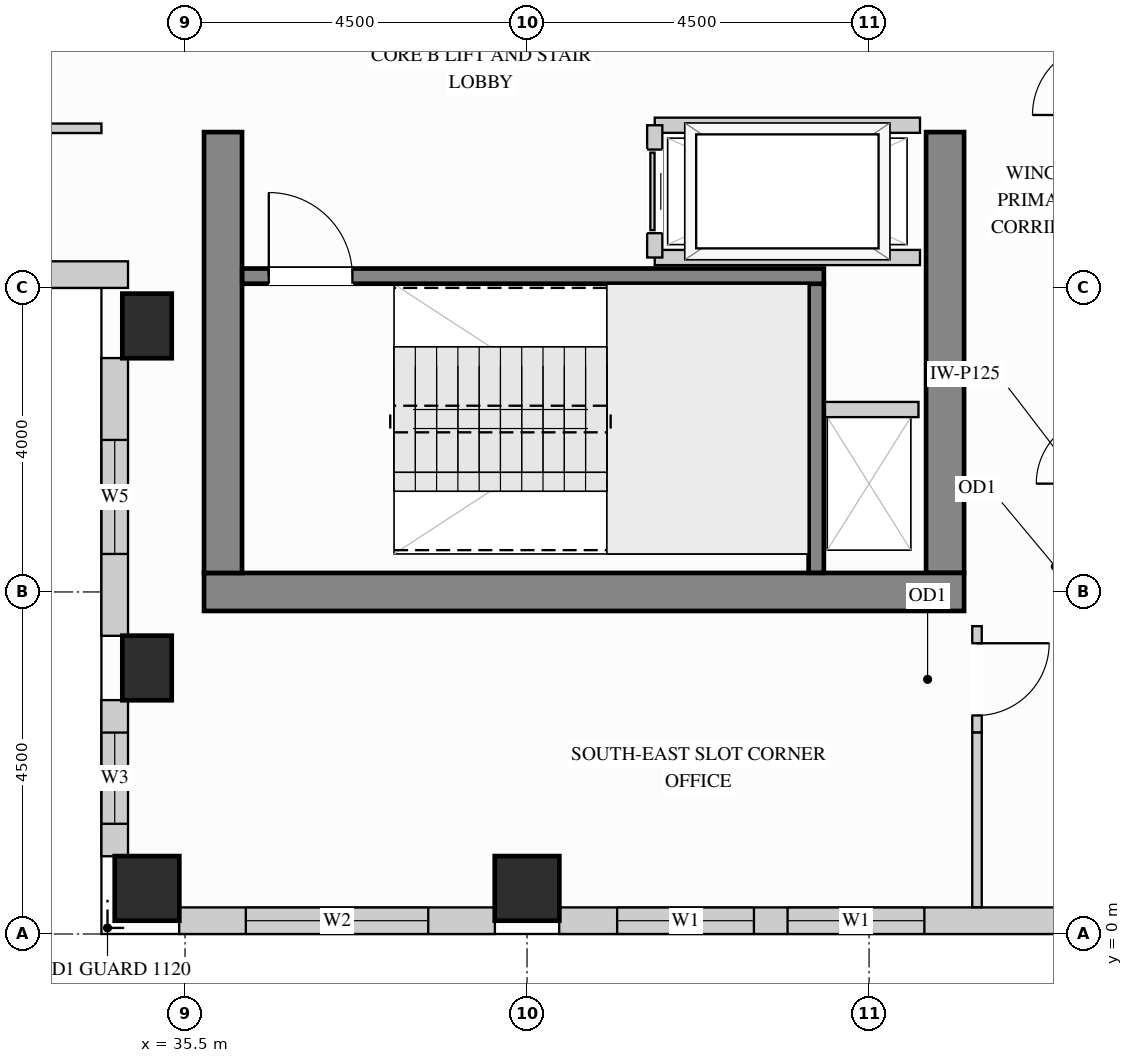
"""IFC4 building model, lengths in metres.
Left out: names, types, materials, properties, quantities, classifications, styles, units other than length and angle.
Written with IfcOpenShell. Run it as: python <this file> out.ifc"""

import sys

from ifc_helpers import new_model, si_unit, direction, frame, frame_2d, origin, origin_2d, place, context, subcontext, project, spatial, rectangle, extrude, source, transform, mapped, element, fill, save


model = new_model("IFC4")
c1 = context("Model", 3, precision=1e-05, world=origin(), true_north=direction((0.0, 1.0)))
c2 = subcontext(c1, "Body", "Model", "MODEL_VIEW")
j1 = project(units=[si_unit("LENGTHUNIT", "METRE"), si_unit("PLANEANGLEUNIT", "RADIAN")], contexts=[c1])
p1 = place(None, origin())
s1 = spatial("IfcSite", under=j1, at=p1, CompositionType="ELEMENT")
p2 = place(p1, origin())
s2 = spatial("IfcBuilding", under=s1, at=p2, CompositionType="ELEMENT")
p3 = place(p2, frame((0.0, 0.0, 226.8)))
s3 = spatial("IfcBuildingStorey", under=s2, at=p3, CompositionType="ELEMENT", Elevation=226.8)
m1 = source(origin(), c2, "Body", "SweptSolid", [
    extrude(rectangle(XDim=0.65, YDim=0.85, at=origin_2d()), origin(), (0.0, 0.0, 1.0), 3.4),
])
for number, where, z_axis, x_axis in (
    (1, (35.0, 3.5, 0.0), (0.0, 0.0, 1.0), (1.0, 0.0, 0.0)),
    (2, (35.0, 8.0, 0.0), (0.0, 0.0, 1.0), (1.0, 0.0, 0.0)),
):
    element("IfcColumn", number, at=place(p3, frame(where, z_axis=z_axis, x_axis=x_axis)), inside=s3, PredefinedType="COLUMN", context=c2, shape_type="MappedRepresentation", body=[
        mapped(m1, transform((0.0, 0.0, 0.0), x_axis=(1.0, 0.0, 0.0), y_axis=(0.0, 1.0, 0.0), z_axis=(0.0, 0.0, 1.0))),
    ])
m2 = source(origin(), c2, "Body", "SweptSolid", [
    extrude(rectangle(XDim=0.85, YDim=0.85, at=origin_2d()), origin(), (0.0, 0.0, 1.0), 3.4),
])
for number, where, z_axis, x_axis in (
    (3, (35.0, 0.6, 0.0), (0.0, 0.0, 1.0), (1.0, 0.0, 0.0)),
    (4, (40.0, 0.6, 0.0), (0.0, 0.0, 1.0), (1.0, 0.0, 0.0)),
):
    element("IfcColumn", number, at=place(p3, frame(where, z_axis=z_axis, x_axis=x_axis)), inside=s3, PredefinedType="COLUMN", context=c2, shape_type="MappedRepresentation", body=[
        mapped(m2, transform((0.0, 0.0, 0.0), x_axis=(1.0, 0.0, 0.0), y_axis=(0.0, 1.0, 0.0), z_axis=(0.0, 0.0, 1.0))),
    ])
m3 = source(origin(), c2, "Body", "SweptSolid", [
    extrude(rectangle(XDim=5.8, YDim=0.5, at=frame_2d((2.9, 0.0))), origin(), (0.0, 0.0, 1.0), 3.4),
])
p4 = place(p3, frame((45.5, 4.75, 0.0), z_axis=(0.0, 0.0, 1.0), x_axis=(0.0, 1.0, 0.0)))
e5 = element("IfcWall", 5, at=p4, inside=s3, PredefinedType="SHEAR", context=c2, shape_type="MappedRepresentation", body=[
    mapped(m3, transform((0.0, 0.0, 0.0), x_axis=(1.0, 0.0, 0.0), y_axis=(0.0, 1.0, 0.0), z_axis=(0.0, 0.0, 1.0))),
])
m4 = source(origin(), c2, "Body", "SweptSolid", [
    extrude(rectangle(XDim=10.0, YDim=0.5, at=frame_2d((5.0, 0.0))), origin(), (0.0, 0.0, 1.0), 3.4),
])
p5 = place(p3, frame((35.75, 4.5, 0.0), z_axis=(0.0, 0.0, 1.0), x_axis=(1.0, 0.0, 0.0)))
e6 = element("IfcWall", 6, at=p5, inside=s3, PredefinedType="SHEAR", context=c2, shape_type="MappedRepresentation", body=[
    mapped(m4, transform((0.0, 0.0, 0.0), x_axis=(1.0, 0.0, 0.0), y_axis=(0.0, 1.0, 0.0), z_axis=(0.0, 0.0, 1.0))),
])
p6 = place(p3, frame((36.0, 4.75, 0.0), z_axis=(0.0, 0.0, 1.0), x_axis=(0.0, 1.0, 0.0)))
e7 = element("IfcWall", 7, at=p6, inside=s3, PredefinedType="SHEAR", context=c2, shape_type="MappedRepresentation", body=[
    mapped(m3, transform((0.0, 0.0, 0.0), x_axis=(1.0, 0.0, 0.0), y_axis=(0.0, 1.0, 0.0), z_axis=(0.0, 0.0, 1.0))),
])
p7 = place(p3, frame((19.323, 8.675, 0.0), z_axis=(0.0, 0.0, 1.0), x_axis=(1.0, 0.0, 0.0)))
e8 = element("IfcWall", 8, at=p7, inside=s3, PredefinedType="SOLIDWALL", context=c2, shape_type="SweptSolid", body=[
    extrude(rectangle(XDim=15.427, YDim=0.35, at=frame_2d((7.713, 0.0))), origin(), (0.0, 0.0, 1.0), 3.385),
])
p8 = place(p7, frame((1.672, 0.0, 0.78)))
e9 = element("IfcOpeningElement", 9, at=p8, cuts=e8, PredefinedType="OPENING", context=c2, shape_type="SweptSolid", body=[
    extrude(rectangle(XDim=1.5, YDim=2.0, at=frame_2d((0.75, 1.0))), frame((0.0, 0.185, 0.0), z_axis=(0.0, -1.0, 0.0), x_axis=(1.0, 0.0, 0.0)), (0.0, 0.0, 1.0), 0.37),
])
p9 = place(p7, frame((4.525, 0.0, 0.78)))
e10 = element("IfcOpeningElement", 10, at=p9, cuts=e8, PredefinedType="OPENING", context=c2, shape_type="SweptSolid", body=[
    extrude(rectangle(XDim=1.5, YDim=2.0, at=frame_2d((0.75, 1.0))), frame((0.0, 0.185, 0.0), z_axis=(0.0, -1.0, 0.0), x_axis=(1.0, 0.0, 0.0)), (0.0, 0.0, 1.0), 0.37),
])
p10 = place(p7, frame((9.287, 0.0, 0.78)))
e11 = element("IfcOpeningElement", 11, at=p10, cuts=e8, PredefinedType="OPENING", context=c2, shape_type="SweptSolid", body=[
    extrude(rectangle(XDim=1.5, YDim=2.0, at=frame_2d((0.75, 1.0))), frame((0.0, 0.185, 0.0), z_axis=(0.0, -1.0, 0.0), x_axis=(1.0, 0.0, 0.0)), (0.0, 0.0, 1.0), 0.37),
])
p11 = place(p7, frame((12.197, 0.0, 0.78)))
e12 = element("IfcOpeningElement", 12, at=p11, cuts=e8, PredefinedType="OPENING", context=c2, shape_type="SweptSolid", body=[
    extrude(rectangle(XDim=1.5, YDim=2.0, at=frame_2d((0.75, 1.0))), frame((0.0, 0.185, 0.0), z_axis=(0.0, -1.0, 0.0), x_axis=(1.0, 0.0, 0.0)), (0.0, 0.0, 1.0), 0.37),
])
p12 = place(p3, frame((34.575, 7.577, 0.0), z_axis=(0.0, 0.0, 1.0), x_axis=(0.0, -1.0, 0.0)))
e13 = element("IfcWall", 13, at=p12, inside=s3, PredefinedType="SOLIDWALL", context=c2, shape_type="SweptSolid", body=[
    extrude(rectangle(XDim=3.654, YDim=0.35, at=frame_2d((1.827, 0.0))), origin(), (0.0, 0.0, 1.0), 3.385),
])
p13 = place(p12, frame((1.077, 0.0, 0.78)))
e14 = element("IfcOpeningElement", 14, at=p13, cuts=e13, PredefinedType="OPENING", context=c2, shape_type="SweptSolid", body=[
    extrude(rectangle(XDim=1.5, YDim=2.0, at=frame_2d((0.75, 1.0))), frame((0.0, 0.185, 0.0), z_axis=(0.0, -1.0, 0.0), x_axis=(1.0, 0.0, 0.0)), (0.0, 0.0, 1.0), 0.37),
])
p14 = place(p3, frame((34.575, 3.077, 0.0), z_axis=(0.0, 0.0, 1.0), x_axis=(0.0, -1.0, 0.0)))
e15 = element("IfcWall", 15, at=p14, inside=s3, PredefinedType="SOLIDWALL", context=c2, shape_type="SweptSolid", body=[
    extrude(rectangle(XDim=2.054, YDim=0.35, at=frame_2d((1.027, 0.0))), origin(), (0.0, 0.0, 1.0), 3.385),
])
p15 = place(p14, frame((0.427, 0.0, 0.78)))
e16 = element("IfcOpeningElement", 16, at=p15, cuts=e15, PredefinedType="OPENING", context=c2, shape_type="SweptSolid", body=[
    extrude(rectangle(XDim=1.2, YDim=2.0, at=frame_2d((0.6, 1.0))), frame((0.0, 0.185, 0.0), z_axis=(0.0, -1.0, 0.0), x_axis=(1.0, 0.0, 0.0)), (0.0, 0.0, 1.0), 0.37),
])
p16 = place(p3, frame((35.423, 0.175, 0.0), z_axis=(0.0, 0.0, 1.0), x_axis=(1.0, 0.0, 0.0)))
e17 = element("IfcWall", 17, at=p16, inside=s3, PredefinedType="SOLIDWALL", context=c2, shape_type="SweptSolid", body=[
    extrude(rectangle(XDim=4.154, YDim=0.35, at=frame_2d((2.077, 0.0))), origin(), (0.0, 0.0, 1.0), 3.385),
])
p17 = place(p16, frame((0.877, 0.0, 0.78)))
e18 = element("IfcOpeningElement", 18, at=p17, cuts=e17, PredefinedType="OPENING", context=c2, shape_type="SweptSolid", body=[
    extrude(rectangle(XDim=2.4, YDim=2.1, at=frame_2d((1.2, 1.05))), frame((0.0, 0.185, 0.0), z_axis=(0.0, -1.0, 0.0), x_axis=(1.0, 0.0, 0.0)), (0.0, 0.0, 1.0), 0.37),
])
p18 = place(p3, frame((40.423, 0.175, 0.0), z_axis=(0.0, 0.0, 1.0), x_axis=(1.0, 0.0, 0.0)))
e19 = element("IfcWall", 19, at=p18, inside=s3, PredefinedType="SOLIDWALL", context=c2, shape_type="SweptSolid", body=[
    extrude(rectangle(XDim=7.077, YDim=0.35, at=frame_2d((3.539, 0.0))), origin(), (0.0, 0.0, 1.0), 3.385),
])
p19 = place(p18, frame((0.762, 0.0, 0.78)))
e20 = element("IfcOpeningElement", 20, at=p19, cuts=e19, PredefinedType="OPENING", context=c2, shape_type="SweptSolid", body=[
    extrude(rectangle(XDim=1.8, YDim=2.1, at=frame_2d((0.9, 1.05))), frame((0.0, 0.185, 0.0), z_axis=(0.0, -1.0, 0.0), x_axis=(1.0, 0.0, 0.0)), (0.0, 0.0, 1.0), 0.37),
])
p20 = place(p18, frame((3.005, 0.0, 0.78)))
e21 = element("IfcOpeningElement", 21, at=p20, cuts=e19, PredefinedType="OPENING", context=c2, shape_type="SweptSolid", body=[
    extrude(rectangle(XDim=1.8, YDim=2.1, at=frame_2d((0.9, 1.05))), frame((0.0, 0.185, 0.0), z_axis=(0.0, -1.0, 0.0), x_axis=(1.0, 0.0, 0.0)), (0.0, 0.0, 1.0), 0.37),
])
p21 = place(p3, frame((45.92, 2.65, 0.0), z_axis=(0.0, 0.0, 1.0), x_axis=(0.0, 1.0, 0.0)))
e22 = element("IfcWall", 22, at=p21, inside=s3, PredefinedType="PARTITIONING", context=c2, shape_type="SweptSolid", body=[
    extrude(rectangle(XDim=1.4, YDim=0.125, at=frame_2d((0.7, 0.0))), origin(), (0.0, 0.0, 1.0), 3.385),
])
p22 = place(p21, frame((0.225, 0.0, 0.0)))
e23 = element("IfcOpeningElement", 23, at=p22, cuts=e22, PredefinedType="OPENING", context=c2, shape_type="SweptSolid", body=[
    extrude(rectangle(XDim=0.95, YDim=2.15, at=frame_2d((0.475, 1.075))), frame((0.0, 0.073, 0.0), z_axis=(0.0, -1.0, 0.0), x_axis=(1.0, 0.0, 0.0)), (0.0, 0.0, 1.0), 0.145),
])
m5 = source(origin(), c2, "Body", "SweptSolid", [
    extrude(rectangle(XDim=2.298, YDim=0.125, at=frame_2d((1.149, 0.0))), origin(), (0.0, 0.0, 1.0), 3.385),
])
p23 = place(p3, frame((45.92, 0.352, 0.0), z_axis=(0.0, 0.0, 1.0), x_axis=(0.0, 1.0, 0.0)))
e24 = element("IfcWall", 24, at=p23, inside=s3, PredefinedType="PARTITIONING", context=c2, shape_type="MappedRepresentation", body=[
    mapped(m5, transform((0.0, 0.0, 0.0), x_axis=(1.0, 0.0, 0.0), y_axis=(0.0, 1.0, 0.0), z_axis=(0.0, 0.0, 1.0))),
])
p24 = place(p3, frame((26.95, 10.6, 0.0), z_axis=(0.0, 0.0, 1.0), x_axis=(1.0, 0.0, 0.0)))
e25 = element("IfcWall", 25, at=p24, inside=s3, PredefinedType="PARTITIONING", context=c2, shape_type="SweptSolid", body=[
    extrude(rectangle(XDim=7.45, YDim=0.125, at=frame_2d((3.725, 0.0))), origin(), (0.0, 0.0, 1.0), 3.385),
])
p25 = place(p24, frame((4.478, 0.0, 0.0)))
e26 = element("IfcOpeningElement", 26, at=p25, cuts=e25, PredefinedType="OPENING", context=c2, shape_type="SweptSolid", body=[
    extrude(rectangle(XDim=0.95, YDim=2.15, at=frame_2d((0.475, 1.075))), frame((0.0, 0.073, 0.0), z_axis=(0.0, -1.0, 0.0), x_axis=(1.0, 0.0, 0.0)), (0.0, 0.0, 1.0), 0.145),
])
m6 = source(origin(), c2, "Body", "SweptSolid", [
    extrude(rectangle(XDim=1.3, YDim=0.2, at=frame_2d((0.65, 0.0))), origin(), (0.0, 0.0, 1.0), 3.385),
])
p26 = place(p3, frame((43.85, 6.9, 0.0), z_axis=(0.0, 0.0, 1.0), x_axis=(1.0, 0.0, 0.0)))
e27 = element("IfcWall", 27, at=p26, inside=s3, PredefinedType="PARTITIONING", context=c2, shape_type="MappedRepresentation", body=[
    mapped(m6, transform((0.0, 0.0, 0.0), x_axis=(1.0, 0.0, 0.0), y_axis=(0.0, 1.0, 0.0), z_axis=(0.0, 0.0, 1.0))),
])
m7 = source(origin(), c2, "Body", "SweptSolid", [
    extrude(rectangle(XDim=3.49, YDim=0.2, at=frame_2d((1.745, 0.0))), origin(), (0.0, 0.0, 1.0), 3.385),
])
for number, where, z_axis, x_axis in (
    (28, (41.68, 10.64, 0.0), (0.0, 0.0, 1.0), (1.0, 0.0, 0.0)),
    (29, (41.68, 8.9, 0.0), (0.0, 0.0, 1.0), (1.0, 0.0, 0.0)),
):
    element("IfcWall", number, at=place(p3, frame(where, z_axis=z_axis, x_axis=x_axis)), inside=s3, PredefinedType="PARTITIONING", context=c2, shape_type="MappedRepresentation", body=[
        mapped(m7, transform((0.0, 0.0, 0.0), x_axis=(1.0, 0.0, 0.0), y_axis=(0.0, 1.0, 0.0), z_axis=(0.0, 0.0, 1.0))),
    ])
p27 = place(p3, frame((41.68, 8.9, 0.0), z_axis=(0.0, 0.0, 1.0), x_axis=(0.0, 1.0, 0.0)))
e30 = element("IfcWall", 30, at=p27, inside=s3, PredefinedType="PARTITIONING", context=c2, shape_type="SweptSolid", body=[
    extrude(rectangle(XDim=1.74, YDim=0.2, at=frame_2d((0.87, 0.0))), origin(), (0.0, 0.0, 1.0), 3.385),
])
p28 = place(p27, frame((0.32, 0.0, 0.0)))
e31 = element("IfcOpeningElement", 31, at=p28, cuts=e30, PredefinedType="OPENING", context=c2, shape_type="SweptSolid", body=[
    extrude(rectangle(XDim=1.1, YDim=2.2, at=frame_2d((0.55, 1.1))), frame((0.0, 0.11, 0.0), z_axis=(0.0, -1.0, 0.0), x_axis=(1.0, 0.0, 0.0)), (0.0, 0.0, 1.0), 0.22),
])
m8 = source(origin(), c2, "Body", "SweptSolid", [
    extrude(rectangle(XDim=3.803, YDim=0.2, at=frame_2d((1.901, 0.0))), origin(), (0.0, 0.0, 1.0), 3.4),
])
p29 = place(p3, frame((43.805, 4.752, 0.0), z_axis=(0.0, 0.0, 1.0), x_axis=(0.0, 1.0, 0.0)))
e32 = element("IfcWall", 32, at=p29, inside=s3, PredefinedType="SHEAR", context=c2, shape_type="MappedRepresentation", body=[
    mapped(m8, transform((0.0, 0.0, 0.0), x_axis=(1.0, 0.0, 0.0), y_axis=(0.0, 1.0, 0.0), z_axis=(0.0, 0.0, 1.0))),
])
p30 = place(p3, frame((36.252, 8.655, 0.0), z_axis=(0.0, 0.0, 1.0), x_axis=(1.0, 0.0, 0.0)))
e33 = element("IfcWall", 33, at=p30, inside=s3, PredefinedType="SHEAR", context=c2, shape_type="SweptSolid", body=[
    extrude(rectangle(XDim=7.653, YDim=0.2, at=frame_2d((3.827, 0.0))), origin(), (0.0, 0.0, 1.0), 3.4),
])
p31 = place(p30, frame((0.35, 0.0, 0.0)))
e34 = element("IfcOpeningElement", 34, at=p31, cuts=e33, PredefinedType="OPENING", context=c2, shape_type="SweptSolid", body=[
    extrude(rectangle(XDim=1.1, YDim=2.15, at=frame_2d((0.55, 1.075))), frame((0.0, 0.11, 0.0), z_axis=(0.0, -1.0, 0.0), x_axis=(1.0, 0.0, 0.0)), (0.0, 0.0, 1.0), 0.22),
])
m9 = source(origin(), c2, "Body", "SweptSolid", [
    extrude(rectangle(XDim=1.1, YDim=2.2, at=frame_2d((0.55, 1.1))), frame((0.0, 0.025, 0.0), z_axis=(0.0, -1.0, 0.0), x_axis=(1.0, 0.0, 0.0)), (0.0, 0.0, 1.0), 0.05),
])
p32 = place(p28, origin())
e35 = element("IfcDoor", 35, at=p32, inside=s3, OperationType="SLIDING_TO_LEFT", PredefinedType="DOOR", context=c2, shape_type="MappedRepresentation", body=[
    mapped(m9, transform((0.0, 0.0, 0.0), x_axis=(1.0, 0.0, 0.0), y_axis=(0.0, 1.0, 0.0), z_axis=(0.0, 0.0, 1.0))),
])
fill(e31, e35)
m10 = source(origin(), c2, "Body", "SweptSolid", [
    extrude(rectangle(XDim=0.95, YDim=2.15, at=frame_2d((0.475, 1.075))), frame((0.0, 0.025, 0.0), z_axis=(0.0, -1.0, 0.0), x_axis=(1.0, 0.0, 0.0)), (0.0, 0.0, 1.0), 0.05),
])
p33 = place(p22, origin())
e36 = element("IfcDoor", 36, at=p33, inside=s3, OperationType="SINGLE_SWING_RIGHT", PredefinedType="DOOR", context=c2, shape_type="MappedRepresentation", body=[
    mapped(m10, transform((0.0, 0.0, 0.0), x_axis=(1.0, 0.0, 0.0), y_axis=(0.0, 1.0, 0.0), z_axis=(0.0, 0.0, 1.0))),
])
fill(e23, e36)
m11 = source(origin(), c2, "Body", "SweptSolid", [
    extrude(rectangle(XDim=1.1, YDim=2.15, at=frame_2d((0.55, 1.075))), frame((0.0, 0.025, 0.0), z_axis=(0.0, -1.0, 0.0), x_axis=(1.0, 0.0, 0.0)), (0.0, 0.0, 1.0), 0.05),
])
p34 = place(p31, origin())
e37 = element("IfcDoor", 37, at=p34, inside=s3, OperationType="SINGLE_SWING_LEFT", PredefinedType="DOOR", context=c2, shape_type="MappedRepresentation", body=[
    mapped(m11, transform((0.0, 0.0, 0.0), x_axis=(1.0, 0.0, 0.0), y_axis=(0.0, 1.0, 0.0), z_axis=(0.0, 0.0, 1.0))),
])
fill(e34, e37)
m12 = source(origin(), c2, "Body", "SweptSolid", [
    extrude(rectangle(XDim=1.8, YDim=2.1, at=frame_2d((0.9, 1.05))), frame((0.0, 0.03, 0.0), z_axis=(0.0, -1.0, 0.0), x_axis=(1.0, 0.0, 0.0)), (0.0, 0.0, 1.0), 0.06),
])
p35 = place(p19, origin())
e38 = element("IfcWindow", 38, at=p35, inside=s3, PartitioningType="SINGLE_PANEL", PredefinedType="WINDOW", context=c2, shape_type="MappedRepresentation", body=[
    mapped(m12, transform((0.0, 0.0, 0.0), x_axis=(1.0, 0.0, 0.0), y_axis=(0.0, 1.0, 0.0), z_axis=(0.0, 0.0, 1.0))),
])
fill(e20, e38)
p36 = place(p20, origin())
e39 = element("IfcWindow", 39, at=p36, inside=s3, PartitioningType="SINGLE_PANEL", PredefinedType="WINDOW", context=c2, shape_type="MappedRepresentation", body=[
    mapped(m12, transform((0.0, 0.0, 0.0), x_axis=(1.0, 0.0, 0.0), y_axis=(0.0, 1.0, 0.0), z_axis=(0.0, 0.0, 1.0))),
])
fill(e21, e39)
m13 = source(origin(), c2, "Body", "SweptSolid", [
    extrude(rectangle(XDim=2.4, YDim=2.1, at=frame_2d((1.2, 1.05))), frame((0.0, 0.03, 0.0), z_axis=(0.0, -1.0, 0.0), x_axis=(1.0, 0.0, 0.0)), (0.0, 0.0, 1.0), 0.06),
])
p37 = place(p17, origin())
e40 = element("IfcWindow", 40, at=p37, inside=s3, PartitioningType="SINGLE_PANEL", PredefinedType="WINDOW", context=c2, shape_type="MappedRepresentation", body=[
    mapped(m13, transform((0.0, 0.0, 0.0), x_axis=(1.0, 0.0, 0.0), y_axis=(0.0, 1.0, 0.0), z_axis=(0.0, 0.0, 1.0))),
])
fill(e18, e40)
m14 = source(origin(), c2, "Body", "SweptSolid", [
    extrude(rectangle(XDim=1.2, YDim=2.0, at=frame_2d((0.6, 1.0))), frame((0.0, 0.03, 0.0), z_axis=(0.0, -1.0, 0.0), x_axis=(1.0, 0.0, 0.0)), (0.0, 0.0, 1.0), 0.06),
])
p38 = place(p15, origin())
e41 = element("IfcWindow", 41, at=p38, inside=s3, PartitioningType="SINGLE_PANEL", PredefinedType="WINDOW", context=c2, shape_type="MappedRepresentation", body=[
    mapped(m14, transform((0.0, 0.0, 0.0), x_axis=(1.0, 0.0, 0.0), y_axis=(0.0, 1.0, 0.0), z_axis=(0.0, 0.0, 1.0))),
])
fill(e16, e41)
m15 = source(origin(), c2, "Body", "SweptSolid", [
    extrude(rectangle(XDim=1.5, YDim=2.0, at=frame_2d((0.75, 1.0))), frame((0.0, 0.03, 0.0), z_axis=(0.0, -1.0, 0.0), x_axis=(1.0, 0.0, 0.0)), (0.0, 0.0, 1.0), 0.06),
])
p39 = place(p13, origin())
e42 = element("IfcWindow", 42, at=p39, inside=s3, PartitioningType="SINGLE_PANEL", PredefinedType="WINDOW", context=c2, shape_type="MappedRepresentation", body=[
    mapped(m15, transform((0.0, 0.0, 0.0), x_axis=(1.0, 0.0, 0.0), y_axis=(0.0, 1.0, 0.0), z_axis=(0.0, 0.0, 1.0))),
])
fill(e14, e42)
save(model, sys.argv[1])
